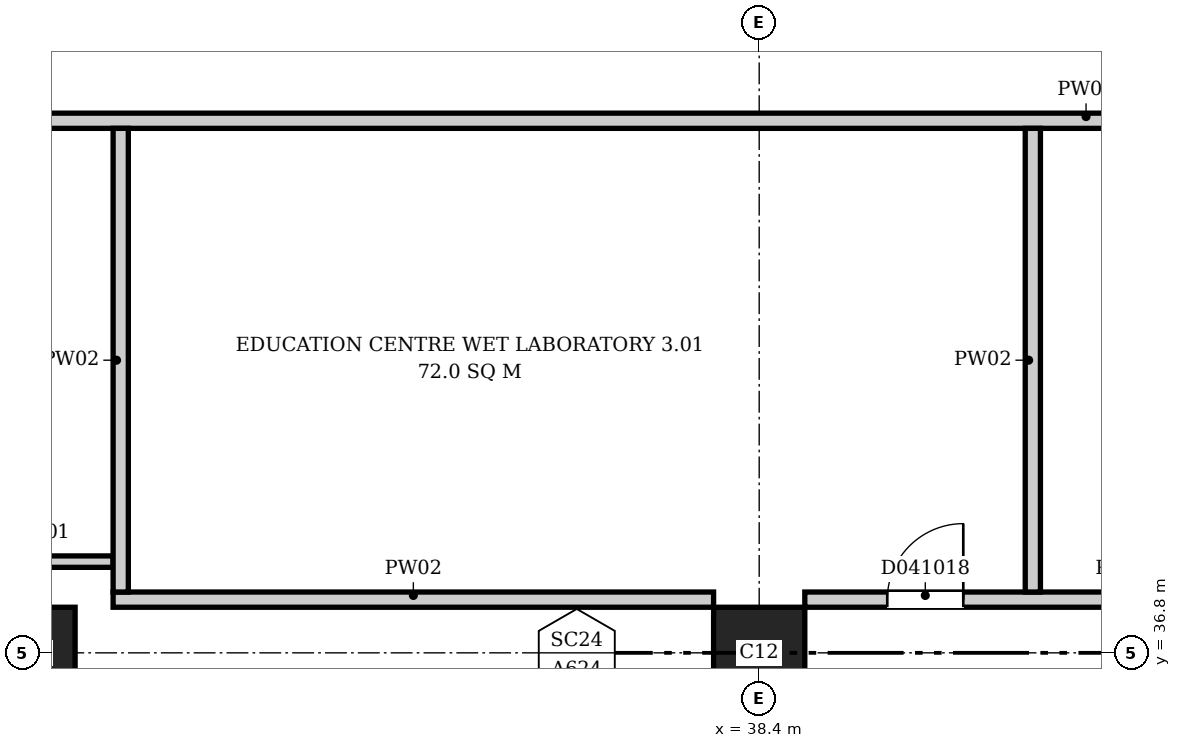
"""IFC4 building model, lengths in metres.
Left out: names, types, materials, properties, quantities, classifications, styles, units other than length and angle.
Written with IfcOpenShell. Run it as: python <this file> out.ifc"""

import sys

from ifc_helpers import new_model, si_unit, direction, frame, frame_2d, origin, origin_2d, place, context, subcontext, project, spatial, rectangle, extrude, element, fill, save


model = new_model("IFC4")
c1 = context("Model", 3, precision=1e-05, world=origin(), true_north=direction((0.0, 1.0)))
c2 = subcontext(c1, "Body", "Model", "MODEL_VIEW")
j1 = project(units=[si_unit("LENGTHUNIT", "METRE"), si_unit("PLANEANGLEUNIT", "RADIAN")], contexts=[c1])
p1 = place(None, origin())
s1 = spatial("IfcSite", under=j1, at=p1, CompositionType="ELEMENT")
p2 = place(p1, origin())
s2 = spatial("IfcBuilding", under=s1, at=p2, CompositionType="ELEMENT")
p3 = place(p2, frame((0.0, 0.0, 21.7)))
s3 = spatial("IfcBuildingStorey", under=s2, at=p3, CompositionType="ELEMENT", Elevation=21.7)
for number, where, z_axis, x_axis in (
    (1, (28.8, 36.8, 0.0), (0.0, 0.0, 1.0), (1.0, 0.0, 0.0)),
    (2, (38.4, 36.8, 0.0), (0.0, 0.0, 1.0), (1.0, 0.0, 0.0)),
):
    element("IfcColumn", number, at=place(p3, frame(where, z_axis=z_axis, x_axis=x_axis)), inside=s3, PredefinedType="COLUMN", context=c2, shape_type="SweptSolid", body=[
        extrude(rectangle(XDim=1.2, YDim=1.2, at=origin_2d()), origin(), (0.0, 0.0, 1.0), 5.0),
    ])
p4 = place(p3, frame((28.006, 38.0, 0.0), z_axis=(0.0, 0.0, 1.0), x_axis=(1.0, 0.0, 0.0)))
e3 = element("IfcWall", 3, at=p4, inside=s3, PredefinedType="PARTITIONING", context=c2, shape_type="SweptSolid", body=[
    extrude(rectangle(XDim=1.894, YDim=0.15, at=frame_2d((0.947, 0.0))), origin(), (0.0, 0.0, 1.0), 4.65),
])
p5 = place(p3, frame((28.006, 43.8, 0.0), z_axis=(0.0, 0.0, 1.0), x_axis=(1.0, 0.0, 0.0)))
e4 = element("IfcWall", 4, at=p5, inside=s3, PredefinedType="PARTITIONING", context=c2, shape_type="SweptSolid", body=[
    extrude(rectangle(XDim=29.388, YDim=0.2, at=frame_2d((14.694, 0.0))), origin(), (0.0, 0.0, 1.0), 4.65),
])
p6 = place(p3, frame((29.9, 37.5, 0.0), z_axis=(0.0, 0.0, 1.0), x_axis=(1.0, 0.0, 0.0)))
e5 = element("IfcWall", 5, at=p6, inside=s3, PredefinedType="PARTITIONING", context=c2, shape_type="SweptSolid", body=[
    extrude(rectangle(XDim=7.9, YDim=0.2, at=frame_2d((3.95, 0.0))), origin(), (0.0, 0.0, 1.0), 4.65),
])
p7 = place(p3, frame((30.0, 37.6, 0.0), z_axis=(0.0, 0.0, 1.0), x_axis=(0.0, 1.0, 0.0)))
e6 = element("IfcWall", 6, at=p7, inside=s3, PredefinedType="PARTITIONING", context=c2, shape_type="SweptSolid", body=[
    extrude(rectangle(XDim=6.1, YDim=0.2, at=frame_2d((3.05, 0.0))), origin(), (0.0, 0.0, 1.0), 4.65),
])
p8 = place(p3, frame((39.0, 37.5, 0.0), z_axis=(0.0, 0.0, 1.0), x_axis=(1.0, 0.0, 0.0)))
e7 = element("IfcWall", 7, at=p8, inside=s3, PredefinedType="PARTITIONING", context=c2, shape_type="SweptSolid", body=[
    extrude(rectangle(XDim=8.4, YDim=0.2, at=frame_2d((4.2, 0.0))), origin(), (0.0, 0.0, 1.0), 4.65),
])
p9 = place(p8, frame((1.085, 0.0, 0.0)))
e8 = element("IfcOpeningElement", 8, at=p9, cuts=e7, PredefinedType="OPENING", context=c2, shape_type="SweptSolid", body=[
    extrude(rectangle(XDim=1.0, YDim=2.1, at=frame_2d((0.5, 1.05))), frame((0.0, 0.11, 0.0), z_axis=(0.0, -1.0, 0.0), x_axis=(1.0, 0.0, 0.0)), (0.0, 0.0, 1.0), 0.22),
])
p10 = place(p3, frame((42.0, 37.6, 0.0), z_axis=(0.0, 0.0, 1.0), x_axis=(0.0, 1.0, 0.0)))
e9 = element("IfcWall", 9, at=p10, inside=s3, PredefinedType="PARTITIONING", context=c2, shape_type="SweptSolid", body=[
    extrude(rectangle(XDim=6.1, YDim=0.2, at=frame_2d((3.05, 0.0))), origin(), (0.0, 0.0, 1.0), 4.65),
])
p11 = place(p9, origin())
e10 = element("IfcDoor", 10, at=p11, inside=s3, OperationType="SINGLE_SWING_RIGHT", PredefinedType="DOOR", context=c2, shape_type="SweptSolid", body=[
    extrude(rectangle(XDim=1.0, YDim=2.1, at=frame_2d((0.5, 1.05))), frame((0.0, 0.025, 0.0), z_axis=(0.0, -1.0, 0.0), x_axis=(1.0, 0.0, 0.0)), (0.0, 0.0, 1.0), 0.05),
])
fill(e8, e10)
save(model, sys.argv[1])
